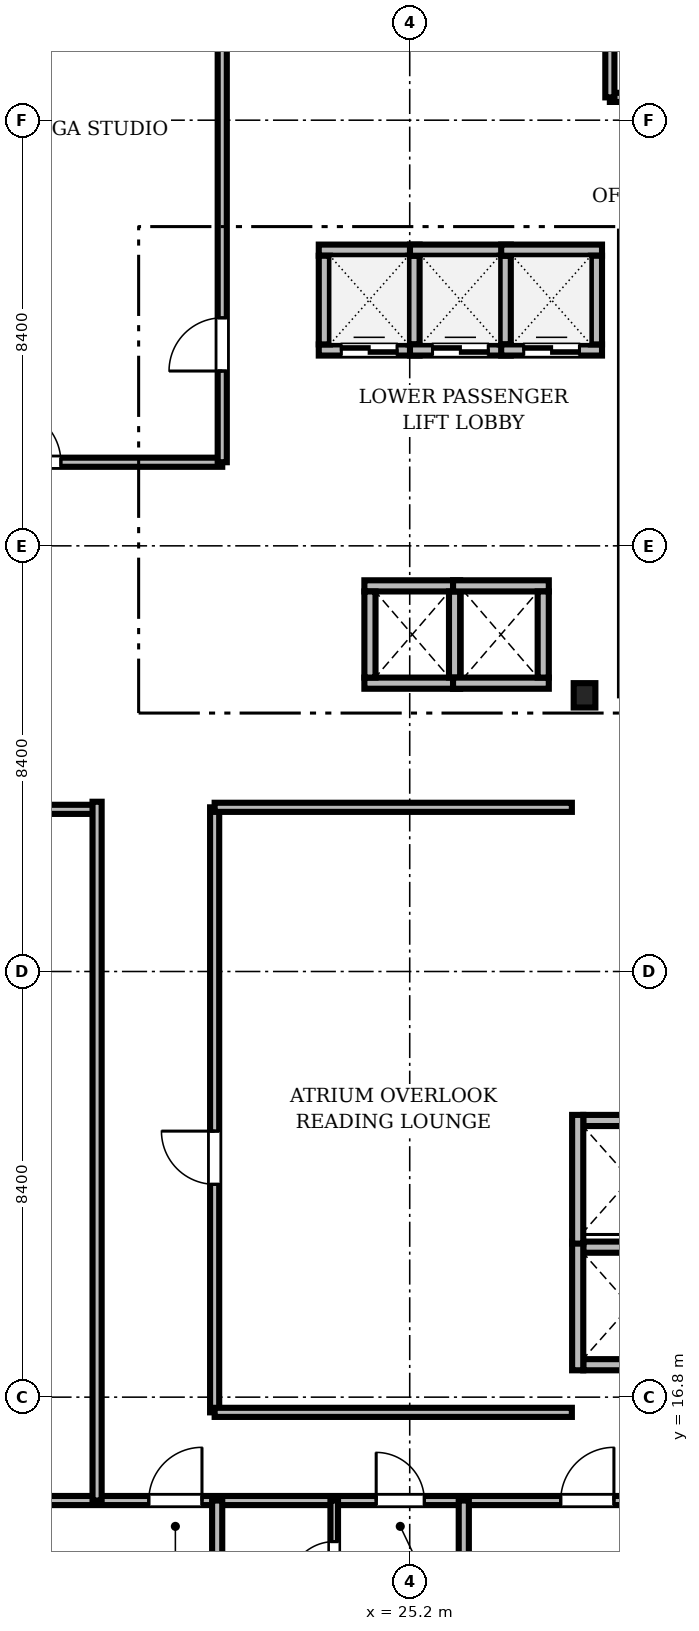
"""IFC4 building model, lengths in metres.
Left out: names, types, materials, properties, quantities, classifications, styles, units other than length and angle.
Written with IfcOpenShell. Run it as: python <this file> out.ifc"""

import sys

from ifc_helpers import new_model, si_unit, direction, frame, frame_2d, origin, origin_2d, place, context, subcontext, project, spatial, rectangle, i_section, extrude, source, transform, mapped, element, fill, save


model = new_model("IFC4")
c1 = context("Model", 3, precision=1e-05, world=origin(), true_north=direction((0.0, 1.0)))
c2 = subcontext(c1, "Body", "Model", "MODEL_VIEW")
j1 = project(units=[si_unit("LENGTHUNIT", "METRE"), si_unit("PLANEANGLEUNIT", "RADIAN")], contexts=[c1])
p1 = place(None, origin())
s1 = spatial("IfcSite", under=j1, at=p1, CompositionType="ELEMENT")
p2 = place(p1, origin())
s2 = spatial("IfcBuilding", under=s1, at=p2, CompositionType="ELEMENT")
p3 = place(p2, frame((0.0, 0.0, 49.5)))
s3 = spatial("IfcBuildingStorey", under=s2, at=p3, CompositionType="ELEMENT", Elevation=49.5)
m1 = source(origin(), c2, "Body", "SweptSolid", [
    extrude(i_section(OverallWidth=0.428, OverallDepth=0.481, WebThickness=0.04, FlangeThickness=0.063, FilletRadius=0.015, at=origin_2d()), origin(), (0.0, 0.0, 1.0), 3.41),
])
p4 = place(p3, frame((28.65, 30.65, 0.0), z_axis=(0.0, 0.0, 1.0), x_axis=(1.0, 0.0, 0.0)))
e1 = element("IfcColumn", 1, at=p4, inside=s3, PredefinedType="COLUMN", context=c2, shape_type="MappedRepresentation", body=[
    mapped(m1, transform((0.0, 0.0, 0.0), scale=1.0)),
])
m2 = source(origin(), c2, "Body", "SweptSolid", [
    extrude(rectangle(XDim=1.99, YDim=0.22, at=frame_2d((0.995, 0.0))), origin(), (0.0, 0.0, 1.0), 3.41),
])
p5 = place(p3, frame((23.405, 37.465, 0.0), z_axis=(0.0, 0.0, 1.0), x_axis=(1.0, 0.0, 0.0)))
e2 = element("IfcWall", 2, at=p5, inside=s3, PredefinedType="SOLIDWALL", context=c2, shape_type="MappedRepresentation", body=[
    mapped(m2, transform((0.0, 0.0, 0.0), scale=1.0)),
])
m3 = source(origin(), c2, "Body", "SweptSolid", [
    extrude(rectangle(XDim=1.1, YDim=2.2, at=frame_2d((0.55, 1.1))), frame((0.0, 0.12, 0.0), z_axis=(0.0, -1.0, 0.0), x_axis=(1.0, 0.0, 0.0)), (0.0, 0.0, 1.0), 0.24),
])
p6 = place(p5, frame((0.445, 0.0, 0.0)))
e3 = element("IfcOpeningElement", 3, at=p6, cuts=e2, PredefinedType="OPENING", context=c2, shape_type="MappedRepresentation", body=[
    mapped(m3, transform((0.0, 0.0, 0.0), scale=1.0)),
])
p7 = place(p3, frame((23.405, 39.435, 0.0), z_axis=(0.0, 0.0, 1.0), x_axis=(1.0, 0.0, 0.0)))
e4 = element("IfcWall", 4, at=p7, inside=s3, PredefinedType="SOLIDWALL", context=c2, shape_type="MappedRepresentation", body=[
    mapped(m2, transform((0.0, 0.0, 0.0), scale=1.0)),
])
m4 = source(origin(), c2, "Body", "SweptSolid", [
    extrude(rectangle(XDim=1.75, YDim=0.22, at=frame_2d((0.875, 0.0))), origin(), (0.0, 0.0, 1.0), 3.41),
])
for number, where, z_axis, x_axis in (
    (5, (23.515, 37.575, 0.0), (0.0, 0.0, 1.0), (0.0, 1.0, 0.0)),
    (6, (25.285, 37.575, 0.0), (0.0, 0.0, 1.0), (0.0, 1.0, 0.0)),
):
    element("IfcWall", number, at=place(p3, frame(where, z_axis=z_axis, x_axis=x_axis)), inside=s3, PredefinedType="SOLIDWALL", context=c2, shape_type="MappedRepresentation", body=[
        mapped(m4, transform((0.0, 0.0, 0.0), scale=1.0)),
    ])
p8 = place(p3, frame((25.205, 37.465, 0.0), z_axis=(0.0, 0.0, 1.0), x_axis=(1.0, 0.0, 0.0)))
e7 = element("IfcWall", 7, at=p8, inside=s3, PredefinedType="SOLIDWALL", context=c2, shape_type="MappedRepresentation", body=[
    mapped(m2, transform((0.0, 0.0, 0.0), scale=1.0)),
])
p9 = place(p8, frame((0.445, 0.0, 0.0)))
e8 = element("IfcOpeningElement", 8, at=p9, cuts=e7, PredefinedType="OPENING", context=c2, shape_type="MappedRepresentation", body=[
    mapped(m3, transform((0.0, 0.0, 0.0), scale=1.0)),
])
p10 = place(p3, frame((25.205, 39.435, 0.0), z_axis=(0.0, 0.0, 1.0), x_axis=(1.0, 0.0, 0.0)))
e9 = element("IfcWall", 9, at=p10, inside=s3, PredefinedType="SOLIDWALL", context=c2, shape_type="MappedRepresentation", body=[
    mapped(m2, transform((0.0, 0.0, 0.0), scale=1.0)),
])
p11 = place(p3, frame((27.085, 37.575, 0.0), z_axis=(0.0, 0.0, 1.0), x_axis=(0.0, 1.0, 0.0)))
e10 = element("IfcWall", 10, at=p11, inside=s3, PredefinedType="SOLIDWALL", context=c2, shape_type="MappedRepresentation", body=[
    mapped(m4, transform((0.0, 0.0, 0.0), scale=1.0)),
])
m5 = source(origin(), c2, "Body", "SweptSolid", [
    extrude(rectangle(XDim=1.99, YDim=0.22, at=frame_2d((0.995, 0.0))), origin(), (0.0, 0.0, 1.0), 3.41),
])
p12 = place(p3, frame((27.005, 37.465, 0.0), z_axis=(0.0, 0.0, 1.0), x_axis=(1.0, 0.0, 0.0)))
e11 = element("IfcWall", 11, at=p12, inside=s3, PredefinedType="SOLIDWALL", context=c2, shape_type="MappedRepresentation", body=[
    mapped(m5, transform((0.0, 0.0, 0.0), scale=1.0)),
])
p13 = place(p12, frame((0.445, 0.0, 0.0)))
e12 = element("IfcOpeningElement", 12, at=p13, cuts=e11, PredefinedType="OPENING", context=c2, shape_type="MappedRepresentation", body=[
    mapped(m3, transform((0.0, 0.0, 0.0), scale=1.0)),
])
p14 = place(p3, frame((27.005, 39.435, 0.0), z_axis=(0.0, 0.0, 1.0), x_axis=(1.0, 0.0, 0.0)))
e13 = element("IfcWall", 13, at=p14, inside=s3, PredefinedType="SOLIDWALL", context=c2, shape_type="MappedRepresentation", body=[
    mapped(m5, transform((0.0, 0.0, 0.0), scale=1.0)),
])
p15 = place(p3, frame((28.885, 37.575, 0.0), z_axis=(0.0, 0.0, 1.0), x_axis=(0.0, 1.0, 0.0)))
e14 = element("IfcWall", 14, at=p15, inside=s3, PredefinedType="SOLIDWALL", context=c2, shape_type="MappedRepresentation", body=[
    mapped(m4, transform((0.0, 0.0, 0.0), scale=1.0)),
])
m6 = source(origin(), c2, "Body", "SweptSolid", [
    extrude(rectangle(XDim=1.89, YDim=0.22, at=frame_2d((0.945, 0.0))), origin(), (0.0, 0.0, 1.0), 3.41),
])
for number, where, z_axis, x_axis in (
    (15, (24.305, 30.89, 0.0), (0.0, 0.0, 1.0), (1.0, 0.0, 0.0)),
    (16, (24.305, 32.81, 0.0), (0.0, 0.0, 1.0), (1.0, 0.0, 0.0)),
):
    element("IfcWall", number, at=place(p3, frame(where, z_axis=z_axis, x_axis=x_axis)), inside=s3, PredefinedType="SOLIDWALL", context=c2, shape_type="MappedRepresentation", body=[
        mapped(m6, transform((0.0, 0.0, 0.0), scale=1.0)),
    ])
m7 = source(origin(), c2, "Body", "SweptSolid", [
    extrude(rectangle(XDim=1.7, YDim=0.22, at=frame_2d((0.85, 0.0))), origin(), (0.0, 0.0, 1.0), 3.41),
])
for number, where, z_axis, x_axis in (
    (17, (24.415, 31.0, 0.0), (0.0, 0.0, 1.0), (0.0, 1.0, 0.0)),
    (18, (26.085, 31.0, 0.0), (0.0, 0.0, 1.0), (0.0, 1.0, 0.0)),
):
    element("IfcWall", number, at=place(p3, frame(where, z_axis=z_axis, x_axis=x_axis)), inside=s3, PredefinedType="SOLIDWALL", context=c2, shape_type="MappedRepresentation", body=[
        mapped(m7, transform((0.0, 0.0, 0.0), scale=1.0)),
    ])
for number, where, z_axis, x_axis in (
    (19, (26.055, 30.89, 0.0), (0.0, 0.0, 1.0), (1.0, 0.0, 0.0)),
    (20, (26.055, 32.81, 0.0), (0.0, 0.0, 1.0), (1.0, 0.0, 0.0)),
):
    element("IfcWall", number, at=place(p3, frame(where, z_axis=z_axis, x_axis=x_axis)), inside=s3, PredefinedType="SOLIDWALL", context=c2, shape_type="MappedRepresentation", body=[
        mapped(m6, transform((0.0, 0.0, 0.0), scale=1.0)),
    ])
p16 = place(p3, frame((27.835, 31.0, 0.0), z_axis=(0.0, 0.0, 1.0), x_axis=(0.0, 1.0, 0.0)))
e21 = element("IfcWall", 21, at=p16, inside=s3, PredefinedType="SOLIDWALL", context=c2, shape_type="MappedRepresentation", body=[
    mapped(m7, transform((0.0, 0.0, 0.0), scale=1.0)),
])
m8 = source(origin(), c2, "Body", "SweptSolid", [
    extrude(rectangle(XDim=1.85, YDim=0.22, at=frame_2d((0.925, 0.0))), origin(), (0.0, 0.0, 1.0), 3.41),
])
for number, where, z_axis, x_axis in (
    (22, (28.625, 17.44, 0.0), (0.0, 0.0, 1.0), (1.0, 0.0, 0.0)),
    (23, (28.625, 19.76, 0.0), (0.0, 0.0, 1.0), (1.0, 0.0, 0.0)),
):
    element("IfcWall", number, at=place(p3, frame(where, z_axis=z_axis, x_axis=x_axis)), inside=s3, PredefinedType="SOLIDWALL", context=c2, shape_type="MappedRepresentation", body=[
        mapped(m8, transform((0.0, 0.0, 0.0), scale=1.0)),
    ])
m9 = source(origin(), c2, "Body", "SweptSolid", [
    extrude(rectangle(XDim=2.54, YDim=0.22, at=frame_2d((1.27, 0.0))), origin(), (0.0, 0.0, 1.0), 3.41),
])
p17 = place(p3, frame((28.515, 17.33, 0.0), z_axis=(0.0, 0.0, 1.0), x_axis=(0.0, 1.0, 0.0)))
e24 = element("IfcWall", 24, at=p17, inside=s3, PredefinedType="SOLIDWALL", context=c2, shape_type="MappedRepresentation", body=[
    mapped(m9, transform((0.0, 0.0, 0.0), scale=1.0)),
])
p18 = place(p3, frame((28.625, 22.26, 0.0), z_axis=(0.0, 0.0, 1.0), x_axis=(1.0, 0.0, 0.0)))
e25 = element("IfcWall", 25, at=p18, inside=s3, PredefinedType="SOLIDWALL", context=c2, shape_type="MappedRepresentation", body=[
    mapped(m8, transform((0.0, 0.0, 0.0), scale=1.0)),
])
p19 = place(p3, frame((28.515, 19.83, 0.0), z_axis=(0.0, 0.0, 1.0), x_axis=(0.0, 1.0, 0.0)))
e26 = element("IfcWall", 26, at=p19, inside=s3, PredefinedType="SOLIDWALL", context=c2, shape_type="MappedRepresentation", body=[
    mapped(m9, transform((0.0, 0.0, 0.0), scale=1.0)),
])
m10 = source(origin(), c2, "Body", "SweptSolid", [
    extrude(rectangle(XDim=46.156, YDim=0.18, at=frame_2d((23.078, 0.0))), origin(), (0.0, 0.0, 1.0), 2.652),
])
p20 = place(p3, frame((2.422, 14.76, 0.0), z_axis=(0.0, 0.0, 1.0), x_axis=(1.0, 0.0, 0.0)))
e27 = element("IfcWall", 27, at=p20, inside=s3, PredefinedType="PARTITIONING", context=c2, shape_type="MappedRepresentation", body=[
    mapped(m10, transform((0.0, 0.0, 0.0), scale=1.0)),
])
m11 = source(origin(), c2, "Body", "SweptSolid", [
    extrude(rectangle(XDim=1.05, YDim=2.2, at=frame_2d((0.525, 1.1))), frame((0.0, 0.1, 0.0), z_axis=(0.0, -1.0, 0.0), x_axis=(1.0, 0.0, 0.0)), (0.0, 0.0, 1.0), 0.2),
])
p21 = place(p20, frame((17.628, 0.0, 0.0)))
e28 = element("IfcOpeningElement", 28, at=p21, cuts=e27, PredefinedType="OPENING", context=c2, shape_type="MappedRepresentation", body=[
    mapped(m11, transform((0.0, 0.0, 0.0), scale=1.0)),
])
m12 = source(origin(), c2, "Body", "SweptSolid", [
    extrude(rectangle(XDim=0.95, YDim=2.15, at=frame_2d((0.475, 1.075))), frame((0.0, 0.1, 0.0), z_axis=(0.0, -1.0, 0.0), x_axis=(1.0, 0.0, 0.0)), (0.0, 0.0, 1.0), 0.2),
])
p22 = place(p20, frame((22.116, 0.0, 0.0)))
e29 = element("IfcOpeningElement", 29, at=p22, cuts=e27, PredefinedType="OPENING", context=c2, shape_type="MappedRepresentation", body=[
    mapped(m12, transform((0.0, 0.0, 0.0), scale=1.0)),
])
p23 = place(p20, frame((25.758, 0.0, 0.0)))
e30 = element("IfcOpeningElement", 30, at=p23, cuts=e27, PredefinedType="OPENING", context=c2, shape_type="MappedRepresentation", body=[
    mapped(m11, transform((0.0, 0.0, 0.0), scale=1.0)),
])
p24 = place(p20, frame((30.625, 0.0, 0.0)))
e31 = element("IfcOpeningElement", 31, at=p24, cuts=e27, PredefinedType="OPENING", context=c2, shape_type="MappedRepresentation", body=[
    mapped(m11, transform((0.0, 0.0, 0.0), scale=1.0)),
])
p25 = place(p20, frame((36.716, 0.0, 0.0)))
e32 = element("IfcOpeningElement", 32, at=p25, cuts=e27, PredefinedType="OPENING", context=c2, shape_type="MappedRepresentation", body=[
    mapped(m12, transform((0.0, 0.0, 0.0), scale=1.0)),
])
p26 = place(p20, frame((41.766, 0.0, 0.0)))
e33 = element("IfcOpeningElement", 33, at=p26, cuts=e27, PredefinedType="OPENING", context=c2, shape_type="MappedRepresentation", body=[
    mapped(m11, transform((0.0, 0.0, 0.0), scale=1.0)),
])
m13 = source(origin(), c2, "Body", "SweptSolid", [
    extrude(rectangle(XDim=19.428, YDim=0.18, at=frame_2d((9.714, 0.0))), origin(), (0.0, 0.0, 1.0), 2.652),
])
p27 = place(p3, frame((29.15, 42.45, 0.0), z_axis=(0.0, 0.0, 1.0), x_axis=(1.0, 0.0, 0.0)))
e34 = element("IfcWall", 34, at=p27, inside=s3, PredefinedType="PARTITIONING", context=c2, shape_type="MappedRepresentation", body=[
    mapped(m13, transform((0.0, 0.0, 0.0), scale=1.0)),
])
p28 = place(p27, frame((4.5, 0.0, 0.0)))
e35 = element("IfcOpeningElement", 35, at=p28, cuts=e34, PredefinedType="OPENING", context=c2, shape_type="MappedRepresentation", body=[
    mapped(m11, transform((0.0, 0.0, 0.0), scale=1.0)),
])
m14 = source(origin(), c2, "Body", "SweptSolid", [
    extrude(rectangle(XDim=19.078, YDim=0.18, at=frame_2d((9.539, 0.0))), origin(), (0.0, 0.0, 1.0), 2.652),
])
p29 = place(p3, frame((2.422, 35.25, 0.0), z_axis=(0.0, 0.0, 1.0), x_axis=(1.0, 0.0, 0.0)))
e36 = element("IfcWall", 36, at=p29, inside=s3, PredefinedType="PARTITIONING", context=c2, shape_type="MappedRepresentation", body=[
    mapped(m14, transform((0.0, 0.0, 0.0), scale=1.0)),
])
p30 = place(p29, frame((14.843, 0.0, 0.0)))
e37 = element("IfcOpeningElement", 37, at=p30, cuts=e36, PredefinedType="OPENING", context=c2, shape_type="MappedRepresentation", body=[
    mapped(m11, transform((0.0, 0.0, 0.0), scale=1.0)),
])
m15 = source(origin(), c2, "Body", "SweptSolid", [
    extrude(rectangle(XDim=13.028, YDim=0.18, at=frame_2d((6.514, 0.0))), origin(), (0.0, 0.0, 1.0), 2.652),
])
p31 = place(p3, frame((21.5, 35.25, 0.0), z_axis=(0.0, 0.0, 1.0), x_axis=(0.0, 1.0, 0.0)))
e38 = element("IfcWall", 38, at=p31, inside=s3, PredefinedType="PARTITIONING", context=c2, shape_type="MappedRepresentation", body=[
    mapped(m15, transform((0.0, 0.0, 0.0), scale=1.0)),
])
p32 = place(p31, frame((1.8, 0.0, 0.0)))
e39 = element("IfcOpeningElement", 39, at=p32, cuts=e38, PredefinedType="OPENING", context=c2, shape_type="MappedRepresentation", body=[
    mapped(m11, transform((0.0, 0.0, 0.0), scale=1.0)),
])
m16 = source(origin(), c2, "Body", "SweptSolid", [
    extrude(rectangle(XDim=11.94, YDim=0.18, at=frame_2d((5.97, 0.0))), origin(), (0.0, 0.0, 1.0), 2.802),
])
p33 = place(p3, frame((21.35, 16.5, 0.0), z_axis=(0.0, 0.0, 1.0), x_axis=(0.0, 1.0, 0.0)))
e40 = element("IfcWall", 40, at=p33, inside=s3, PredefinedType="PARTITIONING", context=c2, shape_type="MappedRepresentation", body=[
    mapped(m16, transform((0.0, 0.0, 0.0), scale=1.0)),
])
p34 = place(p33, frame((4.5, 0.0, 0.0)))
e41 = element("IfcOpeningElement", 41, at=p34, cuts=e40, PredefinedType="OPENING", context=c2, shape_type="MappedRepresentation", body=[
    mapped(m11, transform((0.0, 0.0, 0.0), scale=1.0)),
])
m17 = source(origin(), c2, "Body", "SweptSolid", [
    extrude(rectangle(XDim=2.36, YDim=0.15, at=frame_2d((1.18, 0.0))), origin(), (0.0, 0.0, 1.0), 3.41),
])
p35 = place(p3, frame((23.71, 12.4, 0.0), z_axis=(0.0, 0.0, 1.0), x_axis=(0.0, 1.0, 0.0)))
e42 = element("IfcWall", 42, at=p35, inside=s3, PredefinedType="PARTITIONING", context=c2, shape_type="MappedRepresentation", body=[
    mapped(m17, transform((0.0, 0.0, 0.0), scale=1.0)),
])
m18 = source(origin(), c2, "Body", "SweptSolid", [
    extrude(rectangle(XDim=0.9, YDim=2.1, at=frame_2d((0.45, 1.05))), frame((0.0, 0.085, 0.0), z_axis=(0.0, -1.0, 0.0), x_axis=(1.0, 0.0, 0.0)), (0.0, 0.0, 1.0), 0.17),
])
p36 = place(p35, frame((0.65, 0.0, 0.0)))
e43 = element("IfcOpeningElement", 43, at=p36, cuts=e42, PredefinedType="OPENING", context=c2, shape_type="MappedRepresentation", body=[
    mapped(m18, transform((0.0, 0.0, 0.0), scale=1.0)),
])
m19 = source(origin(), c2, "Body", "SweptSolid", [
    extrude(rectangle(XDim=16.8, YDim=0.18, at=frame_2d((8.4, 0.0))), origin(), (0.0, 0.0, 1.0), 2.652),
])
p37 = place(p3, frame((2.23, 28.4, 0.0), z_axis=(0.0, 0.0, 1.0), x_axis=(1.0, 0.0, 0.0)))
e44 = element("IfcWall", 44, at=p37, inside=s3, PredefinedType="PARTITIONING", context=c2, shape_type="MappedRepresentation", body=[
    mapped(m19, transform((0.0, 0.0, 0.0), scale=1.0)),
])
m20 = source(origin(), c2, "Body", "SweptSolid", [
    extrude(rectangle(XDim=13.79, YDim=0.18, at=frame_2d((6.895, 0.0))), origin(), (0.0, 0.0, 1.0), 2.802),
])
p38 = place(p3, frame((19.03, 14.76, 0.0), z_axis=(0.0, 0.0, 1.0), x_axis=(0.0, 1.0, 0.0)))
e45 = element("IfcWall", 45, at=p38, inside=s3, PredefinedType="PARTITIONING", context=c2, shape_type="MappedRepresentation", body=[
    mapped(m20, transform((0.0, 0.0, 0.0), scale=1.0)),
])
m21 = source(origin(), c2, "Body", "SweptSolid", [
    extrude(rectangle(XDim=12.638, YDim=0.2, at=frame_2d((6.319, 0.0))), origin(), (0.0, 0.0, 1.0), 2.652),
])
p39 = place(p3, frame((21.4, 2.122, 0.0), z_axis=(0.0, 0.0, 1.0), x_axis=(0.0, 1.0, 0.0)))
e46 = element("IfcWall", 46, at=p39, inside=s3, PredefinedType="PARTITIONING", context=c2, shape_type="MappedRepresentation", body=[
    mapped(m21, transform((0.0, 0.0, 0.0), scale=1.0)),
])
m22 = source(origin(), c2, "Body", "SweptSolid", [
    extrude(rectangle(XDim=12.83, YDim=0.2, at=frame_2d((6.415, 0.0))), origin(), (0.0, 0.0, 1.0), 2.652),
])
p40 = place(p3, frame((26.267, 1.93, 0.0), z_axis=(0.0, 0.0, 1.0), x_axis=(0.0, 1.0, 0.0)))
e47 = element("IfcWall", 47, at=p40, inside=s3, PredefinedType="PARTITIONING", context=c2, shape_type="MappedRepresentation", body=[
    mapped(m22, transform((0.0, 0.0, 0.0), scale=1.0)),
])
m23 = source(origin(), c2, "Body", "SweptSolid", [
    extrude(rectangle(XDim=7.05, YDim=0.18, at=frame_2d((3.525, 0.0))), origin(), (0.0, 0.0, 1.0), 2.802),
])
p41 = place(p3, frame((21.35, 16.5, 0.0), z_axis=(0.0, 0.0, 1.0), x_axis=(1.0, 0.0, 0.0)))
e48 = element("IfcWall", 48, at=p41, inside=s3, PredefinedType="PARTITIONING", context=c2, shape_type="MappedRepresentation", body=[
    mapped(m23, transform((0.0, 0.0, 0.0), scale=1.0)),
])
m24 = source(origin(), c2, "Body", "SweptSolid", [
    extrude(rectangle(XDim=7.05, YDim=0.18, at=frame_2d((3.525, 0.0))), origin(), (0.0, 0.0, 1.0), 3.41),
])
p42 = place(p3, frame((21.35, 28.44, 0.0), z_axis=(0.0, 0.0, 1.0), x_axis=(1.0, 0.0, 0.0)))
e49 = element("IfcWall", 49, at=p42, inside=s3, PredefinedType="PARTITIONING", context=c2, shape_type="MappedRepresentation", body=[
    mapped(m24, transform((0.0, 0.0, 0.0), scale=1.0)),
])
m25 = source(origin(), c2, "Body", "SweptSolid", [
    extrude(rectangle(XDim=5.828, YDim=0.18, at=frame_2d((2.914, 0.0))), origin(), (0.0, 0.0, 1.0), 2.652),
])
p43 = place(p3, frame((29.15, 42.45, 0.0), z_axis=(0.0, 0.0, 1.0), x_axis=(0.0, 1.0, 0.0)))
e50 = element("IfcWall", 50, at=p43, inside=s3, PredefinedType="PARTITIONING", context=c2, shape_type="MappedRepresentation", body=[
    mapped(m25, transform((0.0, 0.0, 0.0), scale=1.0)),
])
m26 = source(origin(), c2, "Body", "SweptSolid", [
    extrude(rectangle(XDim=1.1, YDim=2.2, at=frame_2d((0.55, 1.1))), frame((0.0, 0.025, 0.0), z_axis=(0.0, -1.0, 0.0), x_axis=(1.0, 0.0, 0.0)), (0.0, 0.0, 1.0), 0.05),
])
p44 = place(p6, origin())
e51 = element("IfcDoor", 51, at=p44, inside=s3, OperationType="DOUBLE_DOOR_SLIDING", PredefinedType="DOOR", context=c2, shape_type="MappedRepresentation", body=[
    mapped(m26, transform((0.0, 0.0, 0.0), scale=1.0)),
])
fill(e3, e51)
p45 = place(p9, origin())
e52 = element("IfcDoor", 52, at=p45, inside=s3, OperationType="DOUBLE_DOOR_SLIDING", PredefinedType="DOOR", context=c2, shape_type="MappedRepresentation", body=[
    mapped(m26, transform((0.0, 0.0, 0.0), scale=1.0)),
])
fill(e8, e52)
p46 = place(p13, origin())
e53 = element("IfcDoor", 53, at=p46, inside=s3, OperationType="DOUBLE_DOOR_SLIDING", PredefinedType="DOOR", context=c2, shape_type="MappedRepresentation", body=[
    mapped(m26, transform((0.0, 0.0, 0.0), scale=1.0)),
])
fill(e12, e53)
m27 = source(origin(), c2, "Body", "SweptSolid", [
    extrude(rectangle(XDim=1.05, YDim=2.2, at=frame_2d((0.525, 1.1))), frame((0.0, 0.025, 0.0), z_axis=(0.0, -1.0, 0.0), x_axis=(1.0, 0.0, 0.0)), (0.0, 0.0, 1.0), 0.05),
])
p47 = place(p21, origin())
e54 = element("IfcDoor", 54, at=p47, inside=s3, OperationType="SINGLE_SWING_RIGHT", PredefinedType="DOOR", context=c2, shape_type="MappedRepresentation", body=[
    mapped(m27, transform((0.0, 0.0, 0.0), scale=1.0)),
])
fill(e28, e54)
m28 = source(origin(), c2, "Body", "SweptSolid", [
    extrude(rectangle(XDim=0.95, YDim=2.15, at=frame_2d((0.475, 1.075))), frame((0.0, 0.025, 0.0), z_axis=(0.0, -1.0, 0.0), x_axis=(1.0, 0.0, 0.0)), (0.0, 0.0, 1.0), 0.05),
])
p48 = place(p22, origin())
e55 = element("IfcDoor", 55, at=p48, inside=s3, OperationType="SINGLE_SWING_LEFT", PredefinedType="DOOR", context=c2, shape_type="MappedRepresentation", body=[
    mapped(m28, transform((0.0, 0.0, 0.0), scale=1.0)),
])
fill(e29, e55)
p49 = place(p23, origin())
e56 = element("IfcDoor", 56, at=p49, inside=s3, OperationType="SINGLE_SWING_RIGHT", PredefinedType="DOOR", context=c2, shape_type="MappedRepresentation", body=[
    mapped(m27, transform((0.0, 0.0, 0.0), scale=1.0)),
])
fill(e30, e56)
p50 = place(p30, origin())
e57 = element("IfcDoor", 57, at=p50, inside=s3, OperationType="SINGLE_SWING_LEFT", PredefinedType="DOOR", context=c2, shape_type="MappedRepresentation", body=[
    mapped(m27, transform((0.0, 0.0, 0.0), scale=1.0)),
])
fill(e37, e57)
p51 = place(p32, origin())
e58 = element("IfcDoor", 58, at=p51, inside=s3, OperationType="SINGLE_SWING_LEFT", PredefinedType="DOOR", context=c2, shape_type="MappedRepresentation", body=[
    mapped(m27, transform((0.0, 0.0, 0.0), scale=1.0)),
])
fill(e39, e58)
p52 = place(p34, origin())
e59 = element("IfcDoor", 59, at=p52, inside=s3, OperationType="SINGLE_SWING_RIGHT", PredefinedType="DOOR", context=c2, shape_type="MappedRepresentation", body=[
    mapped(m27, transform((0.0, 0.0, 0.0), scale=1.0)),
])
fill(e41, e59)
m29 = source(origin(), c2, "Body", "SweptSolid", [
    extrude(rectangle(XDim=0.9, YDim=2.1, at=frame_2d((0.45, 1.05))), frame((0.0, 0.025, 0.0), z_axis=(0.0, -1.0, 0.0), x_axis=(1.0, 0.0, 0.0)), (0.0, 0.0, 1.0), 0.05),
])
p53 = place(p36, origin())
e60 = element("IfcDoor", 60, at=p53, inside=s3, OperationType="SINGLE_SWING_LEFT", PredefinedType="DOOR", context=c2, shape_type="MappedRepresentation", body=[
    mapped(m29, transform((0.0, 0.0, 0.0), scale=1.0)),
])
fill(e43, e60)
save(model, sys.argv[1])
